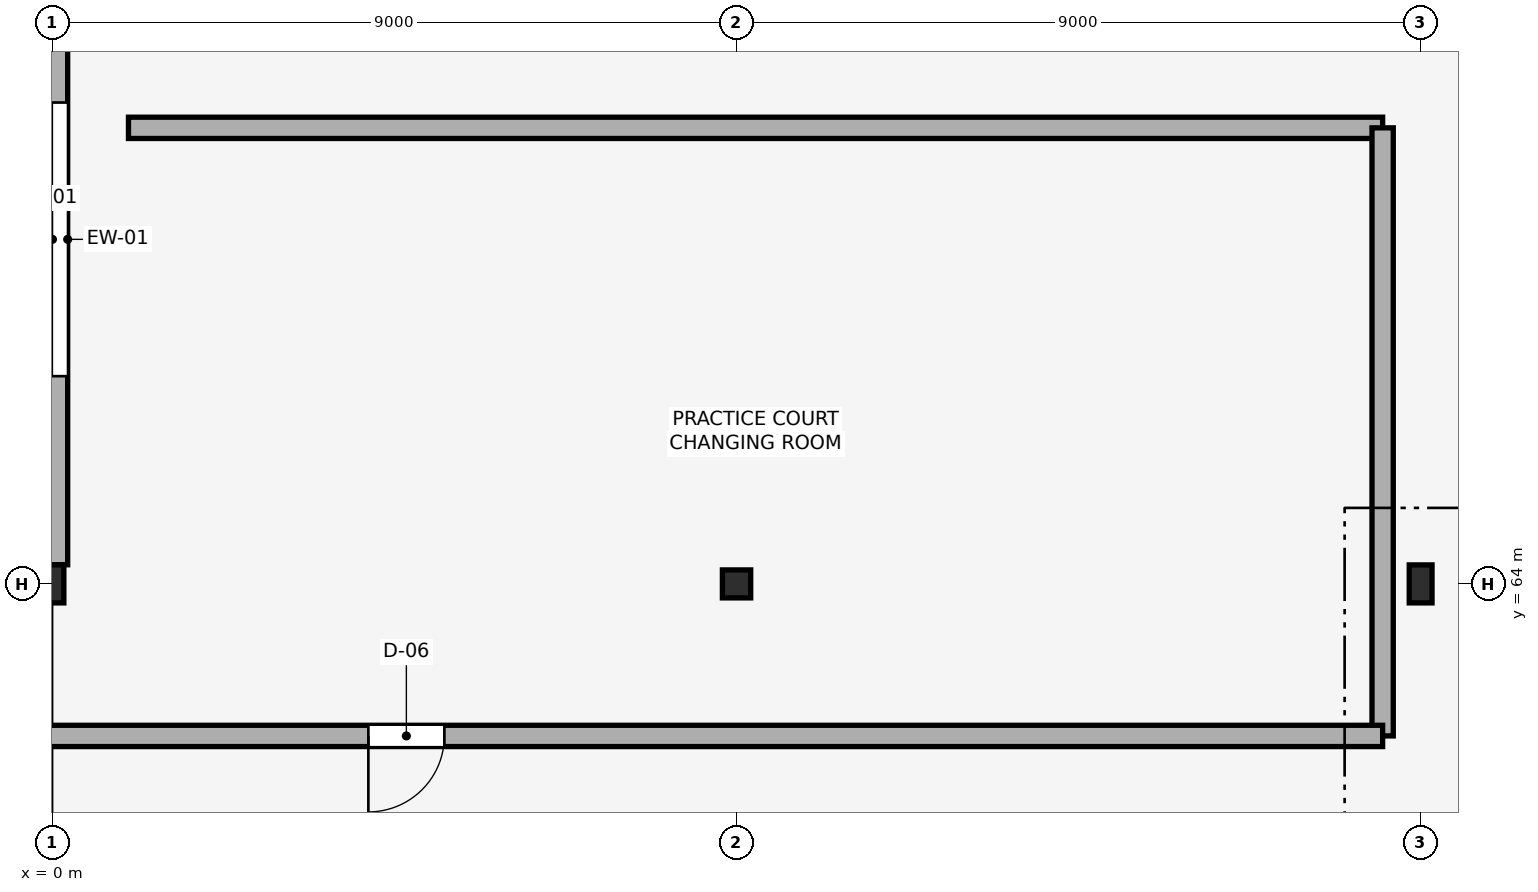
"""IFC4 building model, lengths in metres.
Left out: names, types, materials, properties, quantities, classifications, styles, units other than length and angle.
Written with IfcOpenShell. Run it as: python <this file> out.ifc"""

import sys

from ifc_helpers import new_model, si_unit, direction, frame, frame_2d, origin, origin_2d, place, context, subcontext, project, spatial, rectangle, i_section, extrude, element, fill, save


model = new_model("IFC4")
c1 = context("Model", 3, precision=1e-05, world=origin(), true_north=direction((0.0, 1.0)))
c2 = subcontext(c1, "Body", "Model", "MODEL_VIEW")
j1 = project(units=[si_unit("LENGTHUNIT", "METRE"), si_unit("PLANEANGLEUNIT", "RADIAN")], contexts=[c1])
p1 = place(None, origin())
s1 = spatial("IfcSite", under=j1, at=p1, CompositionType="ELEMENT")
p2 = place(p1, origin())
s2 = spatial("IfcBuilding", under=s1, at=p2, CompositionType="ELEMENT")
p3 = place(p2, origin())
s3 = spatial("IfcBuildingStorey", under=s2, at=p3, CompositionType="ELEMENT", Elevation=0.0)
p4 = place(p3, frame((0.0, 64.0, 0.0), z_axis=(0.0, 0.0, 1.0), x_axis=(1.0, 0.0, 0.0)))
e1 = element("IfcColumn", 1, at=p4, inside=s3, PredefinedType="COLUMN", context=c2, shape_type="SweptSolid", body=[
    extrude(i_section(OverallWidth=0.3, OverallDepth=0.5, WebThickness=0.014, FlangeThickness=0.028, FilletRadius=0.027, at=origin_2d()), origin(), (0.0, 0.0, 1.0), 5.4),
])
p5 = place(p3, frame((9.0, 64.0, 0.0), z_axis=(0.0, 0.0, 1.0), x_axis=(1.0, 0.0, 0.0)))
e2 = element("IfcColumn", 2, at=p5, inside=s3, PredefinedType="COLUMN", context=c2, shape_type="SweptSolid", body=[
    extrude(i_section(OverallWidth=0.373, OverallDepth=0.368, WebThickness=0.014, FlangeThickness=0.024, FilletRadius=0.015, at=origin_2d()), origin(), (0.0, 0.0, 1.0), 5.4),
])
p6 = place(p3, frame((18.0, 64.0, 0.0), z_axis=(0.0, 0.0, 1.0), x_axis=(1.0, 0.0, 0.0)))
e3 = element("IfcColumn", 3, at=p6, inside=s3, PredefinedType="COLUMN", context=c2, shape_type="SweptSolid", body=[
    extrude(i_section(OverallWidth=0.3, OverallDepth=0.5, WebThickness=0.014, FlangeThickness=0.028, FilletRadius=0.027, at=origin_2d()), origin(), (0.0, 0.0, 1.0), 5.4),
])
p7 = place(p3, frame((0.0, 64.252, 0.0), z_axis=(0.0, 0.0, 1.0), x_axis=(0.0, 1.0, 0.0)))
e4 = element("IfcWall", 4, at=p7, inside=s3, PredefinedType="STANDARD", context=c2, shape_type="SweptSolid", body=[
    extrude(rectangle(XDim=8.562, YDim=0.4, at=frame_2d((4.281, 0.0))), origin(), (0.0, 0.0, 1.0), 4.815),
])
p8 = place(p7, frame((2.481, 0.0, 0.85)))
e5 = element("IfcOpeningElement", 5, at=p8, cuts=e4, PredefinedType="OPENING", context=c2, shape_type="SweptSolid", body=[
    extrude(rectangle(XDim=3.6, YDim=2.4, at=frame_2d((1.8, 1.2))), frame((0.0, 0.21, 0.0), z_axis=(0.0, -1.0, 0.0), x_axis=(1.0, 0.0, 0.0)), (0.0, 0.0, 1.0), 0.42),
])
p9 = place(p3, frame((1.0, 70.0, 0.0), z_axis=(0.0, 0.0, 1.0), x_axis=(1.0, 0.0, 0.0)))
e6 = element("IfcWall", 6, at=p9, inside=s3, PredefinedType="PARTITIONING", context=c2, shape_type="SweptSolid", body=[
    extrude(rectangle(XDim=16.5, YDim=0.28, at=frame_2d((8.25, 0.0))), origin(), (0.0, 0.0, 1.0), 4.658),
])
p10 = place(p3, frame((17.5, 70.0, 0.0), z_axis=(0.0, 0.0, 1.0), x_axis=(0.0, -1.0, 0.0)))
e7 = element("IfcWall", 7, at=p10, inside=s3, PredefinedType="PARTITIONING", context=c2, shape_type="SweptSolid", body=[
    extrude(rectangle(XDim=8.0, YDim=0.28, at=frame_2d((4.0, 0.0))), origin(), (0.0, 0.0, 1.0), 5.12),
])
p11 = place(p3, frame((17.5, 62.0, 0.0), z_axis=(0.0, 0.0, 1.0), x_axis=(-1.0, 0.0, 0.0)))
e8 = element("IfcWall", 8, at=p11, inside=s3, PredefinedType="PARTITIONING", context=c2, shape_type="SweptSolid", body=[
    extrude(rectangle(XDim=17.625, YDim=0.28, at=frame_2d((8.812, 0.0))), origin(), (0.0, 0.0, 1.0), 5.12),
])
p12 = place(p11, frame((12.344, 0.0, 0.0)))
e9 = element("IfcOpeningElement", 9, at=p12, cuts=e8, PredefinedType="OPENING", context=c2, shape_type="SweptSolid", body=[
    extrude(rectangle(XDim=1.0, YDim=2.15, at=frame_2d((0.5, 1.075))), frame((0.0, 0.15, 0.0), z_axis=(0.0, -1.0, 0.0), x_axis=(1.0, 0.0, 0.0)), (0.0, 0.0, 1.0), 0.3),
])
p13 = place(p8, origin())
e10 = element("IfcWindow", 10, at=p13, inside=s3, PartitioningType="SINGLE_PANEL", PredefinedType="WINDOW", context=c2, shape_type="SweptSolid", body=[
    extrude(rectangle(XDim=3.6, YDim=2.4, at=frame_2d((1.8, 1.2))), frame((0.0, 0.03, 0.0), z_axis=(0.0, -1.0, 0.0), x_axis=(1.0, 0.0, 0.0)), (0.0, 0.0, 1.0), 0.06),
])
fill(e5, e10)
p14 = place(p12, origin())
e11 = element("IfcDoor", 11, at=p14, inside=s3, OperationType="SINGLE_SWING_RIGHT", PredefinedType="DOOR", context=c2, shape_type="SweptSolid", body=[
    extrude(rectangle(XDim=1.0, YDim=2.15, at=frame_2d((0.5, 1.075))), frame((0.0, 0.025, 0.0), z_axis=(0.0, -1.0, 0.0), x_axis=(1.0, 0.0, 0.0)), (0.0, 0.0, 1.0), 0.05),
])
fill(e9, e11)
save(model, sys.argv[1])
